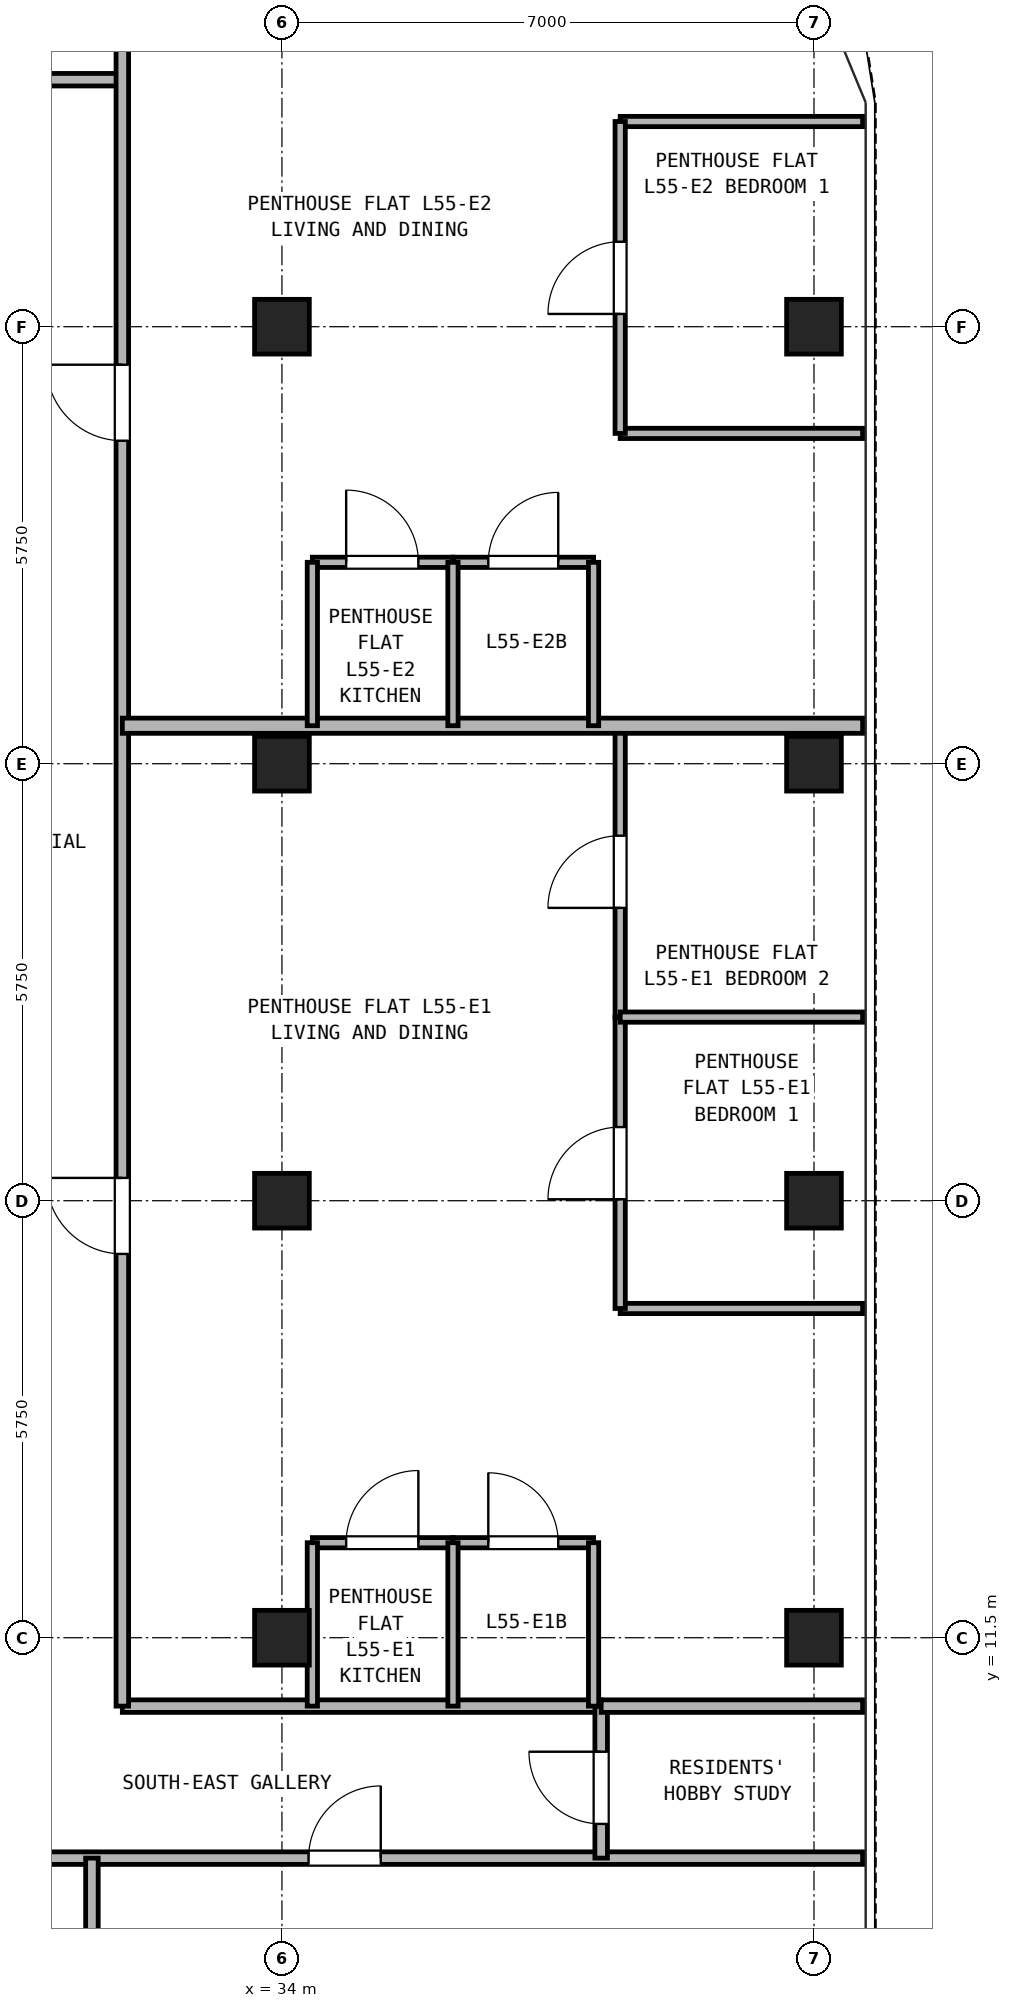
"""IFC4 building model, lengths in metres.
Left out: names, types, materials, properties, quantities, classifications, styles, units other than length and angle.
Written with IfcOpenShell. Run it as: python <this file> out.ifc"""

import sys

from ifc_helpers import new_model, si_unit, direction, frame, frame_2d, origin, origin_2d, place, context, subcontext, project, spatial, rectangle, hollow_rectangle, extrude, source, transform, mapped, element, fill, save


model = new_model("IFC4")
c1 = context("Model", 3, precision=1e-05, world=origin(), true_north=direction((0.0, 1.0)))
c2 = subcontext(c1, "Body", "Model", "MODEL_VIEW")
j1 = project(units=[si_unit("LENGTHUNIT", "METRE"), si_unit("PLANEANGLEUNIT", "RADIAN")], contexts=[c1])
p1 = place(None, origin())
s1 = spatial("IfcSite", under=j1, at=p1, CompositionType="ELEMENT")
p2 = place(p1, origin())
s2 = spatial("IfcBuilding", under=s1, at=p2, CompositionType="ELEMENT")
p3 = place(p2, frame((0.0, 0.0, 196.4)))
s3 = spatial("IfcBuildingStorey", under=s2, at=p3, CompositionType="ELEMENT", Elevation=196.4)
m1 = source(origin(), c2, "Body", "SweptSolid", [
    extrude(hollow_rectangle(XDim=0.72, YDim=0.72, WallThickness=0.04, at=origin_2d()), origin(), (0.0, 0.0, 1.0), 2.95),
])
for number, where, z_axis, x_axis in (
    (1, (41.0, 11.5, 0.0), (0.0, 0.0, 1.0), (1.0, 0.0, 0.0)),
    (2, (41.0, 17.25, 0.0), (0.0, 0.0, 1.0), (1.0, 0.0, 0.0)),
    (3, (41.0, 23.0, 0.0), (0.0, 0.0, 1.0), (1.0, 0.0, 0.0)),
    (4, (41.0, 28.75, 0.0), (0.0, 0.0, 1.0), (1.0, 0.0, 0.0)),
    (5, (34.0, 11.5, 0.0), (0.0, 0.0, 1.0), (1.0, 0.0, 0.0)),
    (6, (34.0, 17.25, 0.0), (0.0, 0.0, 1.0), (1.0, 0.0, 0.0)),
    (7, (34.0, 23.0, 0.0), (0.0, 0.0, 1.0), (1.0, 0.0, 0.0)),
    (8, (34.0, 28.75, 0.0), (0.0, 0.0, 1.0), (1.0, 0.0, 0.0)),
):
    element("IfcColumn", number, at=place(p3, frame(where, z_axis=z_axis, x_axis=x_axis)), inside=s3, PredefinedType="COLUMN", context=c2, shape_type="MappedRepresentation", body=[
        mapped(m1, transform((0.0, 0.0, 0.0), x_axis=(1.0, 0.0, 0.0), y_axis=(0.0, 1.0, 0.0), z_axis=(0.0, 0.0, 1.0), scale=1.0)),
    ])
p4 = place(p3, frame((0.16, 8.6, 0.0), z_axis=(0.0, 0.0, 1.0), x_axis=(1.0, 0.0, 0.0)))
e9 = element("IfcWall", 9, at=p4, inside=s3, PredefinedType="PARTITIONING", context=c2, shape_type="SweptSolid", body=[
    extrude(rectangle(XDim=41.48, YDim=0.165, at=frame_2d((20.74, 0.0))), origin(), (0.0, 0.0, 1.0), 2.583),
])
p5 = place(p4, frame((11.89, 0.0, 0.0)))
e10 = element("IfcOpeningElement", 10, at=p5, cuts=e9, PredefinedType="OPENING", context=c2, shape_type="SweptSolid", body=[
    extrude(rectangle(XDim=0.95, YDim=2.15, at=frame_2d((0.475, 1.075))), frame((0.0, 0.093, 0.0), z_axis=(0.0, -1.0, 0.0), x_axis=(1.0, 0.0, 0.0)), (0.0, 0.0, 1.0), 0.185),
])
p6 = place(p4, frame((20.59, 0.0, 0.0)))
e11 = element("IfcOpeningElement", 11, at=p6, cuts=e9, PredefinedType="OPENING", context=c2, shape_type="SweptSolid", body=[
    extrude(rectangle(XDim=0.95, YDim=2.15, at=frame_2d((0.475, 1.075))), frame((0.0, 0.093, 0.0), z_axis=(0.0, -1.0, 0.0), x_axis=(1.0, 0.0, 0.0)), (0.0, 0.0, 1.0), 0.185),
])
p7 = place(p4, frame((27.59, 0.0, 0.0)))
e12 = element("IfcOpeningElement", 12, at=p7, cuts=e9, PredefinedType="OPENING", context=c2, shape_type="SweptSolid", body=[
    extrude(rectangle(XDim=0.95, YDim=2.15, at=frame_2d((0.475, 1.075))), frame((0.0, 0.093, 0.0), z_axis=(0.0, -1.0, 0.0), x_axis=(1.0, 0.0, 0.0)), (0.0, 0.0, 1.0), 0.185),
])
p8 = place(p4, frame((34.19, 0.0, 0.0)))
e13 = element("IfcOpeningElement", 13, at=p8, cuts=e9, PredefinedType="OPENING", context=c2, shape_type="SweptSolid", body=[
    extrude(rectangle(XDim=0.95, YDim=2.15, at=frame_2d((0.475, 1.075))), frame((0.0, 0.093, 0.0), z_axis=(0.0, -1.0, 0.0), x_axis=(1.0, 0.0, 0.0)), (0.0, 0.0, 1.0), 0.185),
])
p9 = place(p3, frame((31.9, 10.6, 0.0), z_axis=(0.0, 0.0, 1.0), x_axis=(1.0, 0.0, 0.0)))
e14 = element("IfcWall", 14, at=p9, inside=s3, PredefinedType="PARTITIONING", context=c2, shape_type="SweptSolid", body=[
    extrude(rectangle(XDim=6.3, YDim=0.165, at=frame_2d((3.15, 0.0))), origin(), (0.0, 0.0, 1.0), 2.95),
])
p10 = place(p3, frame((38.2, 8.6, 0.0), z_axis=(0.0, 0.0, 1.0), x_axis=(0.0, 1.0, 0.0)))
e15 = element("IfcWall", 15, at=p10, inside=s3, PredefinedType="PARTITIONING", context=c2, shape_type="SweptSolid", body=[
    extrude(rectangle(XDim=2.0, YDim=0.165, at=frame_2d((1.0, 0.0))), origin(), (0.0, 0.0, 1.0), 2.95),
])
p11 = place(p10, frame((0.45, 0.0, 0.0)))
e16 = element("IfcOpeningElement", 16, at=p11, cuts=e15, PredefinedType="OPENING", context=c2, shape_type="SweptSolid", body=[
    extrude(rectangle(XDim=0.95, YDim=2.15, at=frame_2d((0.475, 1.075))), frame((0.0, 0.093, 0.0), z_axis=(0.0, -1.0, 0.0), x_axis=(1.0, 0.0, 0.0)), (0.0, 0.0, 1.0), 0.185),
])
p12 = place(p3, frame((15.1, 32.0, 0.0), z_axis=(0.0, 0.0, 1.0), x_axis=(1.0, 0.0, 0.0)))
e17 = element("IfcWall", 17, at=p12, inside=s3, PredefinedType="PARTITIONING", context=c2, shape_type="SweptSolid", body=[
    extrude(rectangle(XDim=16.8, YDim=0.165, at=frame_2d((8.4, 0.0))), origin(), (0.0, 0.0, 1.0), 2.95),
])
p13 = place(p12, frame((2.7, 0.0, 0.0)))
e18 = element("IfcOpeningElement", 18, at=p13, cuts=e17, PredefinedType="OPENING", context=c2, shape_type="SweptSolid", body=[
    extrude(rectangle(XDim=0.95, YDim=2.15, at=frame_2d((0.475, 1.075))), frame((0.0, 0.093, 0.0), z_axis=(0.0, -1.0, 0.0), x_axis=(1.0, 0.0, 0.0)), (0.0, 0.0, 1.0), 0.185),
])
p14 = place(p12, frame((8.1, 0.0, 0.0)))
e19 = element("IfcOpeningElement", 19, at=p14, cuts=e17, PredefinedType="OPENING", context=c2, shape_type="SweptSolid", body=[
    extrude(rectangle(XDim=0.95, YDim=2.15, at=frame_2d((0.475, 1.075))), frame((0.0, 0.093, 0.0), z_axis=(0.0, -1.0, 0.0), x_axis=(1.0, 0.0, 0.0)), (0.0, 0.0, 1.0), 0.185),
])
p15 = place(p12, frame((13.3, 0.0, 0.0)))
e20 = element("IfcOpeningElement", 20, at=p15, cuts=e17, PredefinedType="OPENING", context=c2, shape_type="SweptSolid", body=[
    extrude(rectangle(XDim=0.92, YDim=2.1, at=frame_2d((0.46, 1.05))), frame((0.0, 0.093, 0.0), z_axis=(0.0, -1.0, 0.0), x_axis=(1.0, 0.0, 0.0)), (0.0, 0.0, 1.0), 0.185),
])
p16 = place(p3, frame((31.9, 10.6, 0.0), z_axis=(0.0, 0.0, 1.0), x_axis=(0.0, 1.0, 0.0)))
e21 = element("IfcWall", 21, at=p16, inside=s3, PredefinedType="PARTITIONING", context=c2, shape_type="SweptSolid", body=[
    extrude(rectangle(XDim=24.54, YDim=0.165, at=frame_2d((12.27, 0.0))), origin(), (0.0, 0.0, 1.0), 2.95),
])
p17 = place(p16, frame((5.95, 0.0, 0.0)))
e22 = element("IfcOpeningElement", 22, at=p17, cuts=e21, PredefinedType="OPENING", context=c2, shape_type="SweptSolid", body=[
    extrude(rectangle(XDim=1.0, YDim=2.15, at=frame_2d((0.5, 1.075))), frame((0.0, 0.093, 0.0), z_axis=(0.0, -1.0, 0.0), x_axis=(1.0, 0.0, 0.0)), (0.0, 0.0, 1.0), 0.185),
])
p18 = place(p16, frame((16.65, 0.0, 0.0)))
e23 = element("IfcOpeningElement", 23, at=p18, cuts=e21, PredefinedType="OPENING", context=c2, shape_type="SweptSolid", body=[
    extrude(rectangle(XDim=1.0, YDim=2.15, at=frame_2d((0.5, 1.075))), frame((0.0, 0.093, 0.0), z_axis=(0.0, -1.0, 0.0), x_axis=(1.0, 0.0, 0.0)), (0.0, 0.0, 1.0), 0.185),
])
p19 = place(p3, frame((31.5, 0.16, 0.0), z_axis=(0.0, 0.0, 1.0), x_axis=(0.0, 1.0, 0.0)))
e24 = element("IfcWall", 24, at=p19, inside=s3, PredefinedType="PARTITIONING", context=c2, shape_type="SweptSolid", body=[
    extrude(rectangle(XDim=8.44, YDim=0.165, at=frame_2d((4.22, 0.0))), origin(), (0.0, 0.0, 1.0), 2.95),
])
p20 = place(p3, frame((38.2, 10.6, 0.0), z_axis=(0.0, 0.0, 1.0), x_axis=(1.0, 0.0, 0.0)))
e25 = element("IfcWall", 25, at=p20, inside=s3, PredefinedType="PARTITIONING", context=c2, shape_type="SweptSolid", body=[
    extrude(rectangle(XDim=3.44, YDim=0.165, at=frame_2d((1.72, 0.0))), origin(), (0.0, 0.0, 1.0), 2.95),
])
p21 = place(p3, frame((34.4, 12.75, 0.0), z_axis=(0.0, 0.0, 1.0), x_axis=(1.0, 0.0, 0.0)))
e26 = element("IfcWall", 26, at=p21, inside=s3, PredefinedType="PARTITIONING", context=c2, shape_type="SweptSolid", body=[
    extrude(rectangle(XDim=1.85, YDim=0.135, at=frame_2d((0.925, 0.0))), origin(), (0.0, 0.0, 1.0), 2.95),
])
p22 = place(p21, frame((0.445, 0.0, 0.0)))
e27 = element("IfcOpeningElement", 27, at=p22, cuts=e26, PredefinedType="OPENING", context=c2, shape_type="SweptSolid", body=[
    extrude(rectangle(XDim=0.95, YDim=2.15, at=frame_2d((0.475, 1.075))), frame((0.0, 0.077, 0.0), z_axis=(0.0, -1.0, 0.0), x_axis=(1.0, 0.0, 0.0)), (0.0, 0.0, 1.0), 0.155),
])
p23 = place(p3, frame((36.25, 12.75, 0.0), z_axis=(0.0, 0.0, 1.0), x_axis=(1.0, 0.0, 0.0)))
e28 = element("IfcWall", 28, at=p23, inside=s3, PredefinedType="PARTITIONING", context=c2, shape_type="SweptSolid", body=[
    extrude(rectangle(XDim=1.85, YDim=0.135, at=frame_2d((0.925, 0.0))), origin(), (0.0, 0.0, 1.0), 2.95),
])
p24 = place(p23, frame((0.465, 0.0, 0.0)))
e29 = element("IfcOpeningElement", 29, at=p24, cuts=e28, PredefinedType="OPENING", context=c2, shape_type="SweptSolid", body=[
    extrude(rectangle(XDim=0.92, YDim=2.1, at=frame_2d((0.46, 1.05))), frame((0.0, 0.077, 0.0), z_axis=(0.0, -1.0, 0.0), x_axis=(1.0, 0.0, 0.0)), (0.0, 0.0, 1.0), 0.155),
])
for number, where, z_axis, x_axis in (
    (30, (34.4, 10.6, 0.0), (0.0, 0.0, 1.0), (0.0, 1.0, 0.0)),
    (31, (36.25, 10.6, 0.0), (0.0, 0.0, 1.0), (0.0, 1.0, 0.0)),
    (32, (38.1, 10.6, 0.0), (0.0, 0.0, 1.0), (0.0, 1.0, 0.0)),
):
    element("IfcWall", number, at=place(p3, frame(where, z_axis=z_axis, x_axis=x_axis)), inside=s3, PredefinedType="PARTITIONING", context=c2, shape_type="SweptSolid", body=[
        extrude(rectangle(XDim=2.15, YDim=0.135, at=frame_2d((1.075, 0.0))), origin(), (0.0, 0.0, 1.0), 2.95),
    ])
p25 = place(p3, frame((38.45, 15.832, 0.0), z_axis=(0.0, 0.0, 1.0), x_axis=(1.0, 0.0, 0.0)))
e33 = element("IfcWall", 33, at=p25, inside=s3, PredefinedType="PARTITIONING", context=c2, shape_type="SweptSolid", body=[
    extrude(rectangle(XDim=3.19, YDim=0.135, at=frame_2d((1.595, 0.0))), origin(), (0.0, 0.0, 1.0), 2.95),
])
p26 = place(p3, frame((38.45, 15.832, 0.0), z_axis=(0.0, 0.0, 1.0), x_axis=(0.0, 1.0, 0.0)))
e34 = element("IfcWall", 34, at=p26, inside=s3, PredefinedType="PARTITIONING", context=c2, shape_type="SweptSolid", body=[
    extrude(rectangle(XDim=3.834, YDim=0.135, at=frame_2d((1.917, 0.0))), origin(), (0.0, 0.0, 1.0), 2.95),
])
p27 = place(p26, frame((1.437, 0.0, 0.0)))
e35 = element("IfcOpeningElement", 35, at=p27, cuts=e34, PredefinedType="OPENING", context=c2, shape_type="SweptSolid", body=[
    extrude(rectangle(XDim=0.95, YDim=2.15, at=frame_2d((0.475, 1.075))), frame((0.0, 0.077, 0.0), z_axis=(0.0, -1.0, 0.0), x_axis=(1.0, 0.0, 0.0)), (0.0, 0.0, 1.0), 0.155),
])
p28 = place(p3, frame((38.45, 19.666, 0.0), z_axis=(0.0, 0.0, 1.0), x_axis=(0.0, 1.0, 0.0)))
e36 = element("IfcWall", 36, at=p28, inside=s3, PredefinedType="PARTITIONING", context=c2, shape_type="SweptSolid", body=[
    extrude(rectangle(XDim=3.834, YDim=0.135, at=frame_2d((1.917, 0.0))), origin(), (0.0, 0.0, 1.0), 2.95),
])
p29 = place(p28, frame((1.437, 0.0, 0.0)))
e37 = element("IfcOpeningElement", 37, at=p29, cuts=e36, PredefinedType="OPENING", context=c2, shape_type="SweptSolid", body=[
    extrude(rectangle(XDim=0.95, YDim=2.15, at=frame_2d((0.475, 1.075))), frame((0.0, 0.077, 0.0), z_axis=(0.0, -1.0, 0.0), x_axis=(1.0, 0.0, 0.0)), (0.0, 0.0, 1.0), 0.155),
])
p30 = place(p3, frame((38.45, 19.666, 0.0), z_axis=(0.0, 0.0, 1.0), x_axis=(1.0, 0.0, 0.0)))
e38 = element("IfcWall", 38, at=p30, inside=s3, PredefinedType="PARTITIONING", context=c2, shape_type="SweptSolid", body=[
    extrude(rectangle(XDim=3.19, YDim=0.135, at=frame_2d((1.595, 0.0))), origin(), (0.0, 0.0, 1.0), 2.95),
])
p31 = place(p3, frame((31.9, 23.5, 0.0), z_axis=(0.0, 0.0, 1.0), x_axis=(1.0, 0.0, 0.0)))
e39 = element("IfcWall", 39, at=p31, inside=s3, PredefinedType="PARTITIONING", context=c2, shape_type="SweptSolid", body=[
    extrude(rectangle(XDim=9.74, YDim=0.2, at=frame_2d((4.87, 0.0))), origin(), (0.0, 0.0, 1.0), 2.95),
])
p32 = place(p3, frame((34.4, 25.65, 0.0), z_axis=(0.0, 0.0, 1.0), x_axis=(1.0, 0.0, 0.0)))
e40 = element("IfcWall", 40, at=p32, inside=s3, PredefinedType="PARTITIONING", context=c2, shape_type="SweptSolid", body=[
    extrude(rectangle(XDim=1.85, YDim=0.135, at=frame_2d((0.925, 0.0))), origin(), (0.0, 0.0, 1.0), 2.583),
])
p33 = place(p32, frame((0.445, 0.0, 0.0)))
e41 = element("IfcOpeningElement", 41, at=p33, cuts=e40, PredefinedType="OPENING", context=c2, shape_type="SweptSolid", body=[
    extrude(rectangle(XDim=0.95, YDim=2.15, at=frame_2d((0.475, 1.075))), frame((0.0, 0.077, 0.0), z_axis=(0.0, -1.0, 0.0), x_axis=(1.0, 0.0, 0.0)), (0.0, 0.0, 1.0), 0.155),
])
p34 = place(p3, frame((36.25, 25.65, 0.0), z_axis=(0.0, 0.0, 1.0), x_axis=(1.0, 0.0, 0.0)))
e42 = element("IfcWall", 42, at=p34, inside=s3, PredefinedType="PARTITIONING", context=c2, shape_type="SweptSolid", body=[
    extrude(rectangle(XDim=1.85, YDim=0.135, at=frame_2d((0.925, 0.0))), origin(), (0.0, 0.0, 1.0), 2.583),
])
p35 = place(p34, frame((0.465, 0.0, 0.0)))
e43 = element("IfcOpeningElement", 43, at=p35, cuts=e42, PredefinedType="OPENING", context=c2, shape_type="SweptSolid", body=[
    extrude(rectangle(XDim=0.92, YDim=2.1, at=frame_2d((0.46, 1.05))), frame((0.0, 0.077, 0.0), z_axis=(0.0, -1.0, 0.0), x_axis=(1.0, 0.0, 0.0)), (0.0, 0.0, 1.0), 0.155),
])
for number, where, z_axis, x_axis in (
    (44, (34.4, 23.5, 0.0), (0.0, 0.0, 1.0), (0.0, 1.0, 0.0)),
    (45, (36.25, 23.5, 0.0), (0.0, 0.0, 1.0), (0.0, 1.0, 0.0)),
    (46, (38.1, 23.5, 0.0), (0.0, 0.0, 1.0), (0.0, 1.0, 0.0)),
):
    element("IfcWall", number, at=place(p3, frame(where, z_axis=z_axis, x_axis=x_axis)), inside=s3, PredefinedType="PARTITIONING", context=c2, shape_type="SweptSolid", body=[
        extrude(rectangle(XDim=2.15, YDim=0.135, at=frame_2d((1.075, 0.0))), origin(), (0.0, 0.0, 1.0), 2.95),
    ])
for number, where, z_axis, x_axis in (
    (47, (38.45, 27.346, 0.0), (0.0, 0.0, 1.0), (1.0, 0.0, 0.0)),
    (48, (38.45, 31.45, 0.0), (0.0, 0.0, 1.0), (1.0, 0.0, 0.0)),
):
    element("IfcWall", number, at=place(p3, frame(where, z_axis=z_axis, x_axis=x_axis)), inside=s3, PredefinedType="PARTITIONING", context=c2, shape_type="SweptSolid", body=[
        extrude(rectangle(XDim=3.19, YDim=0.135, at=frame_2d((1.595, 0.0))), origin(), (0.0, 0.0, 1.0), 2.95),
    ])
p36 = place(p3, frame((38.45, 27.346, 0.0), z_axis=(0.0, 0.0, 1.0), x_axis=(0.0, 1.0, 0.0)))
e49 = element("IfcWall", 49, at=p36, inside=s3, PredefinedType="PARTITIONING", context=c2, shape_type="SweptSolid", body=[
    extrude(rectangle(XDim=4.104, YDim=0.135, at=frame_2d((2.052, 0.0))), origin(), (0.0, 0.0, 1.0), 2.95),
])
p37 = place(p36, frame((1.572, 0.0, 0.0)))
e50 = element("IfcOpeningElement", 50, at=p37, cuts=e49, PredefinedType="OPENING", context=c2, shape_type="SweptSolid", body=[
    extrude(rectangle(XDim=0.95, YDim=2.15, at=frame_2d((0.475, 1.075))), frame((0.0, 0.077, 0.0), z_axis=(0.0, -1.0, 0.0), x_axis=(1.0, 0.0, 0.0)), (0.0, 0.0, 1.0), 0.155),
])
p38 = place(p8, frame((0.95, 0.0, 0.0), z_axis=(0.0, 0.0, 1.0), x_axis=(-1.0, 0.0, 0.0)))
e51 = element("IfcDoor", 51, at=p38, inside=s3, OperationType="SINGLE_SWING_RIGHT", PredefinedType="DOOR", context=c2, shape_type="SweptSolid", body=[
    extrude(rectangle(XDim=0.95, YDim=2.15, at=frame_2d((0.475, 1.075))), frame((0.0, 0.025, 0.0), z_axis=(0.0, -1.0, 0.0), x_axis=(1.0, 0.0, 0.0)), (0.0, 0.0, 1.0), 0.05),
])
fill(e13, e51)
p39 = place(p11, origin())
e52 = element("IfcDoor", 52, at=p39, inside=s3, OperationType="SINGLE_SWING_RIGHT", PredefinedType="DOOR", context=c2, shape_type="SweptSolid", body=[
    extrude(rectangle(XDim=0.95, YDim=2.15, at=frame_2d((0.475, 1.075))), frame((0.0, 0.025, 0.0), z_axis=(0.0, -1.0, 0.0), x_axis=(1.0, 0.0, 0.0)), (0.0, 0.0, 1.0), 0.05),
])
fill(e16, e52)
p40 = place(p22, origin())
e53 = element("IfcDoor", 53, at=p40, inside=s3, OperationType="SINGLE_SWING_RIGHT", PredefinedType="DOOR", context=c2, shape_type="SweptSolid", body=[
    extrude(rectangle(XDim=0.95, YDim=2.15, at=frame_2d((0.475, 1.075))), frame((0.0, 0.025, 0.0), z_axis=(0.0, -1.0, 0.0), x_axis=(1.0, 0.0, 0.0)), (0.0, 0.0, 1.0), 0.05),
])
fill(e27, e53)
p41 = place(p24, origin())
e54 = element("IfcDoor", 54, at=p41, inside=s3, OperationType="SINGLE_SWING_LEFT", PredefinedType="DOOR", context=c2, shape_type="SweptSolid", body=[
    extrude(rectangle(XDim=0.92, YDim=2.1, at=frame_2d((0.46, 1.05))), frame((0.0, 0.025, 0.0), z_axis=(0.0, -1.0, 0.0), x_axis=(1.0, 0.0, 0.0)), (0.0, 0.0, 1.0), 0.05),
])
fill(e29, e54)
p42 = place(p27, frame((0.95, 0.0, 0.0), z_axis=(0.0, 0.0, 1.0), x_axis=(-1.0, 0.0, 0.0)))
e55 = element("IfcDoor", 55, at=p42, inside=s3, OperationType="SINGLE_SWING_LEFT", PredefinedType="DOOR", context=c2, shape_type="SweptSolid", body=[
    extrude(rectangle(XDim=0.95, YDim=2.15, at=frame_2d((0.475, 1.075))), frame((0.0, 0.025, 0.0), z_axis=(0.0, -1.0, 0.0), x_axis=(1.0, 0.0, 0.0)), (0.0, 0.0, 1.0), 0.05),
])
fill(e35, e55)
p43 = place(p29, frame((0.95, 0.0, 0.0), z_axis=(0.0, 0.0, 1.0), x_axis=(-1.0, 0.0, 0.0)))
e56 = element("IfcDoor", 56, at=p43, inside=s3, OperationType="SINGLE_SWING_LEFT", PredefinedType="DOOR", context=c2, shape_type="SweptSolid", body=[
    extrude(rectangle(XDim=0.95, YDim=2.15, at=frame_2d((0.475, 1.075))), frame((0.0, 0.025, 0.0), z_axis=(0.0, -1.0, 0.0), x_axis=(1.0, 0.0, 0.0)), (0.0, 0.0, 1.0), 0.05),
])
fill(e37, e56)
p44 = place(p17, frame((1.0, 0.0, 0.0), z_axis=(0.0, 0.0, 1.0), x_axis=(-1.0, 0.0, 0.0)))
e57 = element("IfcDoor", 57, at=p44, inside=s3, OperationType="SINGLE_SWING_RIGHT", PredefinedType="DOOR", context=c2, shape_type="SweptSolid", body=[
    extrude(rectangle(XDim=1.0, YDim=2.15, at=frame_2d((0.5, 1.075))), frame((0.0, 0.025, 0.0), z_axis=(0.0, -1.0, 0.0), x_axis=(1.0, 0.0, 0.0)), (0.0, 0.0, 1.0), 0.05),
])
fill(e22, e57)
p45 = place(p33, origin())
e58 = element("IfcDoor", 58, at=p45, inside=s3, OperationType="SINGLE_SWING_LEFT", PredefinedType="DOOR", context=c2, shape_type="SweptSolid", body=[
    extrude(rectangle(XDim=0.95, YDim=2.15, at=frame_2d((0.475, 1.075))), frame((0.0, 0.025, 0.0), z_axis=(0.0, -1.0, 0.0), x_axis=(1.0, 0.0, 0.0)), (0.0, 0.0, 1.0), 0.05),
])
fill(e41, e58)
p46 = place(p35, origin())
e59 = element("IfcDoor", 59, at=p46, inside=s3, OperationType="SINGLE_SWING_RIGHT", PredefinedType="DOOR", context=c2, shape_type="SweptSolid", body=[
    extrude(rectangle(XDim=0.92, YDim=2.1, at=frame_2d((0.46, 1.05))), frame((0.0, 0.025, 0.0), z_axis=(0.0, -1.0, 0.0), x_axis=(1.0, 0.0, 0.0)), (0.0, 0.0, 1.0), 0.05),
])
fill(e43, e59)
p47 = place(p37, frame((0.95, 0.0, 0.0), z_axis=(0.0, 0.0, 1.0), x_axis=(-1.0, 0.0, 0.0)))
e60 = element("IfcDoor", 60, at=p47, inside=s3, OperationType="SINGLE_SWING_LEFT", PredefinedType="DOOR", context=c2, shape_type="SweptSolid", body=[
    extrude(rectangle(XDim=0.95, YDim=2.15, at=frame_2d((0.475, 1.075))), frame((0.0, 0.025, 0.0), z_axis=(0.0, -1.0, 0.0), x_axis=(1.0, 0.0, 0.0)), (0.0, 0.0, 1.0), 0.05),
])
fill(e50, e60)
p48 = place(p18, frame((1.0, 0.0, 0.0), z_axis=(0.0, 0.0, 1.0), x_axis=(-1.0, 0.0, 0.0)))
e61 = element("IfcDoor", 61, at=p48, inside=s3, OperationType="SINGLE_SWING_RIGHT", PredefinedType="DOOR", context=c2, shape_type="SweptSolid", body=[
    extrude(rectangle(XDim=1.0, YDim=2.15, at=frame_2d((0.5, 1.075))), frame((0.0, 0.025, 0.0), z_axis=(0.0, -1.0, 0.0), x_axis=(1.0, 0.0, 0.0)), (0.0, 0.0, 1.0), 0.05),
])
fill(e23, e61)
save(model, sys.argv[1])
